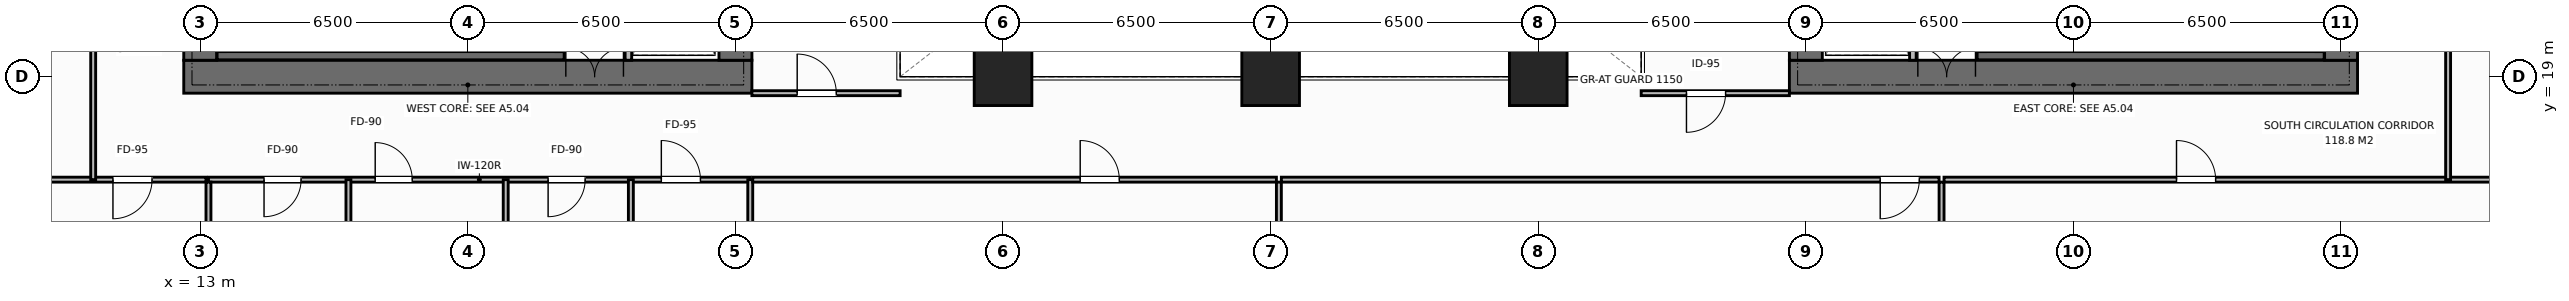
"""IFC4 building model, lengths in metres.
Left out: names, types, materials, properties, quantities, classifications, styles, units other than length and angle.
Written with IfcOpenShell. Run it as: python <this file> out.ifc"""

import sys

from ifc_helpers import new_model, si_unit, direction, frame, frame_2d, origin, origin_2d, place, context, subcontext, project, spatial, rectangle, extrude, element, fill, save


model = new_model("IFC4")
c1 = context("Model", 3, precision=1e-05, world=origin(), true_north=direction((0.0, 1.0)))
c2 = subcontext(c1, "Body", "Model", "MODEL_VIEW")
j1 = project(units=[si_unit("LENGTHUNIT", "METRE"), si_unit("PLANEANGLEUNIT", "RADIAN")], contexts=[c1])
p1 = place(None, origin())
s1 = spatial("IfcSite", under=j1, at=p1, CompositionType="ELEMENT")
p2 = place(p1, origin())
s2 = spatial("IfcBuilding", under=s1, at=p2, CompositionType="ELEMENT")
p3 = place(p2, frame((0.0, 0.0, 39.2)))
s3 = spatial("IfcBuildingStorey", under=s2, at=p3, CompositionType="ELEMENT", Elevation=39.2)
p4 = place(p3, frame((12.6, 19.0, 0.0), z_axis=(0.0, 0.0, 1.0), x_axis=(1.0, 0.0, 0.0)))
e1 = element("IfcWall", 1, at=p4, inside=s3, PredefinedType="SHEAR", context=c2, shape_type="SweptSolid", body=[
    extrude(rectangle(XDim=13.8, YDim=0.8, at=frame_2d((6.9, 0.0))), origin(), (0.0, 0.0, 1.0), 3.8),
])
p5 = place(p4, frame((9.28, 0.0, 0.0)))
e2 = element("IfcOpeningElement", 2, at=p5, cuts=e1, PredefinedType="OPENING", context=c2, shape_type="SweptSolid", body=[
    extrude(rectangle(XDim=1.4, YDim=2.2, at=frame_2d((0.7, 1.1))), frame((0.0, 0.41, 0.0), z_axis=(0.0, -1.0, 0.0), x_axis=(1.0, 0.0, 0.0)), (0.0, 0.0, 1.0), 0.82),
])
p6 = place(p3, frame((13.0, 19.4, 0.0), z_axis=(0.0, 0.0, 1.0), x_axis=(0.0, 1.0, 0.0)))
e3 = element("IfcWall", 3, at=p6, inside=s3, PredefinedType="SHEAR", context=c2, shape_type="SweptSolid", body=[
    extrude(rectangle(XDim=13.2, YDim=0.8, at=frame_2d((6.6, 0.0))), origin(), (0.0, 0.0, 1.0), 3.8),
])
p7 = place(p6, frame((4.65, 0.0, 0.0)))
e4 = element("IfcOpeningElement", 4, at=p7, cuts=e3, PredefinedType="OPENING", context=c2, shape_type="SweptSolid", body=[
    extrude(rectangle(XDim=1.4, YDim=2.2, at=frame_2d((0.7, 1.1))), frame((0.0, 0.41, 0.0), z_axis=(0.0, -1.0, 0.0), x_axis=(1.0, 0.0, 0.0)), (0.0, 0.0, 1.0), 0.82),
])
p8 = place(p3, frame((26.0, 19.4, 0.0), z_axis=(0.0, 0.0, 1.0), x_axis=(0.0, 1.0, 0.0)))
e5 = element("IfcWall", 5, at=p8, inside=s3, PredefinedType="SHEAR", context=c2, shape_type="SweptSolid", body=[
    extrude(rectangle(XDim=13.2, YDim=0.8, at=frame_2d((6.6, 0.0))), origin(), (0.0, 0.0, 1.0), 3.8),
])
p9 = place(p3, frame((51.6, 19.0, 0.0), z_axis=(0.0, 0.0, 1.0), x_axis=(1.0, 0.0, 0.0)))
e6 = element("IfcWall", 6, at=p9, inside=s3, PredefinedType="SHEAR", context=c2, shape_type="SweptSolid", body=[
    extrude(rectangle(XDim=13.8, YDim=0.8, at=frame_2d((6.9, 0.0))), origin(), (0.0, 0.0, 1.0), 3.8),
])
p10 = place(p9, frame((3.12, 0.0, 0.0)))
e7 = element("IfcOpeningElement", 7, at=p10, cuts=e6, PredefinedType="OPENING", context=c2, shape_type="SweptSolid", body=[
    extrude(rectangle(XDim=1.4, YDim=2.2, at=frame_2d((0.7, 1.1))), frame((0.0, 0.41, 0.0), z_axis=(0.0, -1.0, 0.0), x_axis=(1.0, 0.0, 0.0)), (0.0, 0.0, 1.0), 0.82),
])
p11 = place(p3, frame((52.0, 19.4, 0.0), z_axis=(0.0, 0.0, 1.0), x_axis=(0.0, 1.0, 0.0)))
e8 = element("IfcWall", 8, at=p11, inside=s3, PredefinedType="SHEAR", context=c2, shape_type="SweptSolid", body=[
    extrude(rectangle(XDim=13.2, YDim=0.8, at=frame_2d((6.6, 0.0))), origin(), (0.0, 0.0, 1.0), 3.8),
])
p12 = place(p3, frame((65.0, 19.4, 0.0), z_axis=(0.0, 0.0, 1.0), x_axis=(0.0, 1.0, 0.0)))
e9 = element("IfcWall", 9, at=p12, inside=s3, PredefinedType="SHEAR", context=c2, shape_type="SweptSolid", body=[
    extrude(rectangle(XDim=13.2, YDim=0.8, at=frame_2d((6.6, 0.0))), origin(), (0.0, 0.0, 1.0), 3.8),
])
p13 = place(p12, frame((8.05, 0.0, 0.0)))
e10 = element("IfcOpeningElement", 10, at=p13, cuts=e9, PredefinedType="OPENING", context=c2, shape_type="SweptSolid", body=[
    extrude(rectangle(XDim=1.3, YDim=2.2, at=frame_2d((0.65, 1.1))), frame((0.0, 0.41, 0.0), z_axis=(0.0, -1.0, 0.0), x_axis=(1.0, 0.0, 0.0)), (0.0, 0.0, 1.0), 0.82),
])
for number, where, z_axis, x_axis in (
    (11, (13.41, 19.51, 0.0), (0.0, 0.0, 1.0), (1.0, 0.0, 0.0)),
    (12, (56.16, 19.51, 0.0), (0.0, 0.0, 1.0), (1.0, 0.0, 0.0)),
):
    element("IfcWall", number, at=place(p3, frame(where, z_axis=z_axis, x_axis=x_axis)), inside=s3, PredefinedType="SHEAR", context=c2, shape_type="SweptSolid", body=[
        extrude(rectangle(XDim=8.43, YDim=0.2, at=frame_2d((4.215, 0.0))), origin(), (0.0, 0.0, 1.0), 3.8),
    ])
for number, where, z_axis, x_axis in (
    (13, (32.5, 19.0, 0.0), (0.0, 0.0, 1.0), (1.0, 0.0, 0.0)),
    (14, (39.0, 19.0, 0.0), (0.0, 0.0, 1.0), (1.0, 0.0, 0.0)),
    (15, (45.5, 19.0, 0.0), (0.0, 0.0, 1.0), (1.0, 0.0, 0.0)),
):
    element("IfcColumn", number, at=place(p3, frame(where, z_axis=z_axis, x_axis=x_axis)), inside=s3, PredefinedType="COLUMN", context=c2, shape_type="SweptSolid", body=[
        extrude(rectangle(XDim=1.4, YDim=1.4, at=origin_2d()), origin(), (0.0, 0.0, 1.0), 3.8),
    ])
p14 = place(p3, frame((23.4, 19.4, 0.0), z_axis=(0.0, 0.0, 1.0), x_axis=(0.0, 1.0, 0.0)))
e16 = element("IfcWall", 16, at=p14, inside=s3, PredefinedType="STANDARD", context=c2, shape_type="SweptSolid", body=[
    extrude(rectangle(XDim=13.2, YDim=0.16, at=frame_2d((6.6, 0.0))), origin(), (0.0, 0.0, 1.0), 3.55),
])
p15 = place(p14, frame((0.55, 0.0, 0.0)))
e17 = element("IfcOpeningElement", 17, at=p15, cuts=e16, PredefinedType="OPENING", context=c2, shape_type="SweptSolid", body=[
    extrude(rectangle(XDim=1.1, YDim=2.2, at=frame_2d((0.55, 1.1))), frame((0.0, 0.09, 0.0), z_axis=(0.0, -1.0, 0.0), x_axis=(1.0, 0.0, 0.0)), (0.0, 0.0, 1.0), 0.18),
])
p16 = place(p14, frame((2.7, 0.0, 0.0)))
e18 = element("IfcOpeningElement", 18, at=p16, cuts=e16, PredefinedType="OPENING", context=c2, shape_type="SweptSolid", body=[
    extrude(rectangle(XDim=1.1, YDim=2.2, at=frame_2d((0.55, 1.1))), frame((0.0, 0.09, 0.0), z_axis=(0.0, -1.0, 0.0), x_axis=(1.0, 0.0, 0.0)), (0.0, 0.0, 1.0), 0.18),
])
p17 = place(p3, frame((54.6, 19.4, 0.0), z_axis=(0.0, 0.0, 1.0), x_axis=(0.0, 1.0, 0.0)))
e19 = element("IfcWall", 19, at=p17, inside=s3, PredefinedType="STANDARD", context=c2, shape_type="SweptSolid", body=[
    extrude(rectangle(XDim=13.2, YDim=0.16, at=frame_2d((6.6, 0.0))), origin(), (0.0, 0.0, 1.0), 3.55),
])
p18 = place(p17, frame((0.55, 0.0, 0.0)))
e20 = element("IfcOpeningElement", 20, at=p18, cuts=e19, PredefinedType="OPENING", context=c2, shape_type="SweptSolid", body=[
    extrude(rectangle(XDim=1.1, YDim=2.2, at=frame_2d((0.55, 1.1))), frame((0.0, 0.09, 0.0), z_axis=(0.0, -1.0, 0.0), x_axis=(1.0, 0.0, 0.0)), (0.0, 0.0, 1.0), 0.18),
])
p19 = place(p17, frame((2.7, 0.0, 0.0)))
e21 = element("IfcOpeningElement", 21, at=p19, cuts=e19, PredefinedType="OPENING", context=c2, shape_type="SweptSolid", body=[
    extrude(rectangle(XDim=1.1, YDim=2.2, at=frame_2d((0.55, 1.1))), frame((0.0, 0.09, 0.0), z_axis=(0.0, -1.0, 0.0), x_axis=(1.0, 0.0, 0.0)), (0.0, 0.0, 1.0), 0.18),
])
p20 = place(p3, frame((26.4, 18.6, 0.0), z_axis=(0.0, 0.0, 1.0), x_axis=(1.0, 0.0, 0.0)))
e22 = element("IfcWall", 22, at=p20, inside=s3, PredefinedType="PARTITIONING", context=c2, shape_type="SweptSolid", body=[
    extrude(rectangle(XDim=3.6, YDim=0.12, at=frame_2d((1.8, 0.0))), origin(), (0.0, 0.0, 1.0), 3.55),
])
p21 = place(p20, frame((1.1, 0.0, 0.0)))
e23 = element("IfcOpeningElement", 23, at=p21, cuts=e22, PredefinedType="OPENING", context=c2, shape_type="SweptSolid", body=[
    extrude(rectangle(XDim=0.95, YDim=2.15, at=frame_2d((0.475, 1.075))), frame((0.0, 0.07, 0.0), z_axis=(0.0, -1.0, 0.0), x_axis=(1.0, 0.0, 0.0)), (0.0, 0.0, 1.0), 0.14),
])
p22 = place(p3, frame((48.0, 18.6, 0.0), z_axis=(0.0, 0.0, 1.0), x_axis=(1.0, 0.0, 0.0)))
e24 = element("IfcWall", 24, at=p22, inside=s3, PredefinedType="PARTITIONING", context=c2, shape_type="SweptSolid", body=[
    extrude(rectangle(XDim=3.6, YDim=0.12, at=frame_2d((1.8, 0.0))), origin(), (0.0, 0.0, 1.0), 3.55),
])
p23 = place(p22, frame((1.1, 0.0, 0.0)))
e25 = element("IfcOpeningElement", 25, at=p23, cuts=e24, PredefinedType="OPENING", context=c2, shape_type="SweptSolid", body=[
    extrude(rectangle(XDim=0.95, YDim=2.15, at=frame_2d((0.475, 1.075))), frame((0.0, 0.07, 0.0), z_axis=(0.0, -1.0, 0.0), x_axis=(1.0, 0.0, 0.0)), (0.0, 0.0, 1.0), 0.14),
])
p24 = place(p3, frame((13.2, 16.5, 0.0), z_axis=(0.0, 0.0, 1.0), x_axis=(1.0, 0.0, 0.0)))
e26 = element("IfcWall", 26, at=p24, inside=s3, PredefinedType="PARTITIONING", context=c2, shape_type="SweptSolid", body=[
    extrude(rectangle(XDim=13.16, YDim=0.12, at=frame_2d((6.58, 0.0))), origin(), (0.0, 0.0, 1.0), 3.55),
])
p25 = place(p24, frame((1.35, 0.0, 0.0)))
e27 = element("IfcOpeningElement", 27, at=p25, cuts=e26, PredefinedType="OPENING", context=c2, shape_type="SweptSolid", body=[
    extrude(rectangle(XDim=0.9, YDim=2.15, at=frame_2d((0.45, 1.075))), frame((0.0, 0.07, 0.0), z_axis=(0.0, -1.0, 0.0), x_axis=(1.0, 0.0, 0.0)), (0.0, 0.0, 1.0), 0.14),
])
p26 = place(p24, frame((4.05, 0.0, 0.0)))
e28 = element("IfcOpeningElement", 28, at=p26, cuts=e26, PredefinedType="OPENING", context=c2, shape_type="SweptSolid", body=[
    extrude(rectangle(XDim=0.9, YDim=2.15, at=frame_2d((0.45, 1.075))), frame((0.0, 0.07, 0.0), z_axis=(0.0, -1.0, 0.0), x_axis=(1.0, 0.0, 0.0)), (0.0, 0.0, 1.0), 0.14),
])
p27 = place(p24, frame((8.25, 0.0, 0.0)))
e29 = element("IfcOpeningElement", 29, at=p27, cuts=e26, PredefinedType="OPENING", context=c2, shape_type="SweptSolid", body=[
    extrude(rectangle(XDim=0.9, YDim=2.15, at=frame_2d((0.45, 1.075))), frame((0.0, 0.07, 0.0), z_axis=(0.0, -1.0, 0.0), x_axis=(1.0, 0.0, 0.0)), (0.0, 0.0, 1.0), 0.14),
])
p28 = place(p24, frame((11.0, 0.0, 0.0)))
e30 = element("IfcOpeningElement", 30, at=p28, cuts=e26, PredefinedType="OPENING", context=c2, shape_type="SweptSolid", body=[
    extrude(rectangle(XDim=0.95, YDim=2.15, at=frame_2d((0.475, 1.075))), frame((0.0, 0.07, 0.0), z_axis=(0.0, -1.0, 0.0), x_axis=(1.0, 0.0, 0.0)), (0.0, 0.0, 1.0), 0.14),
])
for number, where, z_axis, x_axis in (
    (31, (16.6, 13.82, 0.0), (0.0, 0.0, 1.0), (0.0, 1.0, 0.0)),
    (32, (20.42, 13.82, 0.0), (0.0, 0.0, 1.0), (0.0, 1.0, 0.0)),
    (33, (23.46, 13.82, 0.0), (0.0, 0.0, 1.0), (0.0, 1.0, 0.0)),
    (34, (26.36, 13.82, 0.0), (0.0, 0.0, 1.0), (0.0, 1.0, 0.0)),
):
    element("IfcWall", number, at=place(p3, frame(where, z_axis=z_axis, x_axis=x_axis)), inside=s3, PredefinedType="PARTITIONING", context=c2, shape_type="SweptSolid", body=[
        extrude(rectangle(XDim=2.68, YDim=0.12, at=frame_2d((1.34, 0.0))), origin(), (0.0, 0.0, 1.0), 3.55),
    ])
p29 = place(p3, frame((13.2, 0.02, 0.0), z_axis=(0.0, 0.0, 1.0), x_axis=(0.0, 1.0, 0.0)))
e35 = element("IfcWall", 35, at=p29, inside=s3, PredefinedType="PARTITIONING", context=c2, shape_type="SweptSolid", body=[
    extrude(rectangle(XDim=16.42, YDim=0.12, at=frame_2d((8.21, 0.0))), origin(), (0.0, 0.0, 1.0), 2.9),
])
p30 = place(p3, frame((-0.02, 16.5, 0.0), z_axis=(0.0, 0.0, 1.0), x_axis=(1.0, 0.0, 0.0)))
e36 = element("IfcWall", 36, at=p30, inside=s3, PredefinedType="PARTITIONING", context=c2, shape_type="SweptSolid", body=[
    extrude(rectangle(XDim=13.16, YDim=0.12, at=frame_2d((6.58, 0.0))), origin(), (0.0, 0.0, 1.0), 3.55),
])
p31 = place(p30, frame((10.9, 0.0, 0.0)))
e37 = element("IfcOpeningElement", 37, at=p31, cuts=e36, PredefinedType="OPENING", context=c2, shape_type="SweptSolid", body=[
    extrude(rectangle(XDim=0.95, YDim=2.15, at=frame_2d((0.475, 1.075))), frame((0.0, 0.07, 0.0), z_axis=(0.0, -1.0, 0.0), x_axis=(1.0, 0.0, 0.0)), (0.0, 0.0, 1.0), 0.14),
])
p32 = place(p3, frame((39.2, 0.02, 0.0), z_axis=(0.0, 0.0, 1.0), x_axis=(0.0, 1.0, 0.0)))
e38 = element("IfcWall", 38, at=p32, inside=s3, PredefinedType="PARTITIONING", context=c2, shape_type="SweptSolid", body=[
    extrude(rectangle(XDim=16.42, YDim=0.12, at=frame_2d((8.21, 0.0))), origin(), (0.0, 0.0, 1.0), 2.9),
])
p33 = place(p3, frame((26.42, 16.5, 0.0), z_axis=(0.0, 0.0, 1.0), x_axis=(1.0, 0.0, 0.0)))
e39 = element("IfcWall", 39, at=p33, inside=s3, PredefinedType="PARTITIONING", context=c2, shape_type="SweptSolid", body=[
    extrude(rectangle(XDim=12.72, YDim=0.12, at=frame_2d((6.36, 0.0))), origin(), (0.0, 0.0, 1.0), 3.55),
])
p34 = place(p33, frame((7.954, 0.0, 0.0)))
e40 = element("IfcOpeningElement", 40, at=p34, cuts=e39, PredefinedType="OPENING", context=c2, shape_type="SweptSolid", body=[
    extrude(rectangle(XDim=0.95, YDim=2.15, at=frame_2d((0.475, 1.075))), frame((0.0, 0.07, 0.0), z_axis=(0.0, -1.0, 0.0), x_axis=(1.0, 0.0, 0.0)), (0.0, 0.0, 1.0), 0.14),
])
p35 = place(p3, frame((55.296, 0.02, 0.0), z_axis=(0.0, 0.0, 1.0), x_axis=(0.0, 1.0, 0.0)))
e41 = element("IfcWall", 41, at=p35, inside=s3, PredefinedType="PARTITIONING", context=c2, shape_type="SweptSolid", body=[
    extrude(rectangle(XDim=16.42, YDim=0.12, at=frame_2d((8.21, 0.0))), origin(), (0.0, 0.0, 1.0), 3.55),
])
p36 = place(p3, frame((39.26, 16.5, 0.0), z_axis=(0.0, 0.0, 1.0), x_axis=(1.0, 0.0, 0.0)))
e42 = element("IfcWall", 42, at=p36, inside=s3, PredefinedType="PARTITIONING", context=c2, shape_type="SweptSolid", body=[
    extrude(rectangle(XDim=15.976, YDim=0.12, at=frame_2d((7.988, 0.0))), origin(), (0.0, 0.0, 1.0), 3.55),
])
p37 = place(p36, frame((14.546, 0.0, 0.0)))
e43 = element("IfcOpeningElement", 43, at=p37, cuts=e42, PredefinedType="OPENING", context=c2, shape_type="SweptSolid", body=[
    extrude(rectangle(XDim=0.95, YDim=2.15, at=frame_2d((0.475, 1.075))), frame((0.0, 0.07, 0.0), z_axis=(0.0, -1.0, 0.0), x_axis=(1.0, 0.0, 0.0)), (0.0, 0.0, 1.0), 0.14),
])
p38 = place(p3, frame((55.356, 16.5, 0.0), z_axis=(0.0, 0.0, 1.0), x_axis=(1.0, 0.0, 0.0)))
e44 = element("IfcWall", 44, at=p38, inside=s3, PredefinedType="PARTITIONING", context=c2, shape_type="SweptSolid", body=[
    extrude(rectangle(XDim=22.664, YDim=0.12, at=frame_2d((11.332, 0.0))), origin(), (0.0, 0.0, 1.0), 3.55),
])
p39 = place(p38, frame((5.647, 0.0, 0.0)))
e45 = element("IfcOpeningElement", 45, at=p39, cuts=e44, PredefinedType="OPENING", context=c2, shape_type="SweptSolid", body=[
    extrude(rectangle(XDim=0.95, YDim=2.15, at=frame_2d((0.475, 1.075))), frame((0.0, 0.07, 0.0), z_axis=(0.0, -1.0, 0.0), x_axis=(1.0, 0.0, 0.0)), (0.0, 0.0, 1.0), 0.14),
])
p40 = place(p3, frame((10.4, 16.5, 0.0), z_axis=(0.0, 0.0, 1.0), x_axis=(0.0, 1.0, 0.0)))
e46 = element("IfcWall", 46, at=p40, inside=s3, PredefinedType="PARTITIONING", context=c2, shape_type="SweptSolid", body=[
    extrude(rectangle(XDim=9.5, YDim=0.12, at=frame_2d((4.75, 0.0))), origin(), (0.0, 0.0, 1.0), 3.55),
])
p41 = place(p40, frame((5.325, 0.0, 0.0)))
e47 = element("IfcOpeningElement", 47, at=p41, cuts=e46, PredefinedType="OPENING", context=c2, shape_type="SweptSolid", body=[
    extrude(rectangle(XDim=0.95, YDim=2.15, at=frame_2d((0.475, 1.075))), frame((0.0, 0.07, 0.0), z_axis=(0.0, -1.0, 0.0), x_axis=(1.0, 0.0, 0.0)), (0.0, 0.0, 1.0), 0.14),
])
p42 = place(p3, frame((67.6, 16.5, 0.0), z_axis=(0.0, 0.0, 1.0), x_axis=(0.0, 1.0, 0.0)))
e48 = element("IfcWall", 48, at=p42, inside=s3, PredefinedType="PARTITIONING", context=c2, shape_type="SweptSolid", body=[
    extrude(rectangle(XDim=19.0, YDim=0.12, at=frame_2d((9.5, 0.0))), origin(), (0.0, 0.0, 1.0), 3.55),
])
p43 = place(p42, frame((9.025, 0.0, 0.0)))
e49 = element("IfcOpeningElement", 49, at=p43, cuts=e48, PredefinedType="OPENING", context=c2, shape_type="SweptSolid", body=[
    extrude(rectangle(XDim=0.95, YDim=2.15, at=frame_2d((0.475, 1.075))), frame((0.0, 0.07, 0.0), z_axis=(0.0, -1.0, 0.0), x_axis=(1.0, 0.0, 0.0)), (0.0, 0.0, 1.0), 0.14),
])
p44 = place(p5, origin())
e50 = element("IfcDoor", 50, at=p44, inside=s3, OperationType="DOUBLE_DOOR_SINGLE_SWING", PredefinedType="DOOR", context=c2, shape_type="SweptSolid", body=[
    extrude(rectangle(XDim=1.4, YDim=2.2, at=frame_2d((0.7, 1.1))), frame((0.0, 0.125, 0.0), z_axis=(0.0, -1.0, 0.0), x_axis=(1.0, 0.0, 0.0)), (0.0, 0.0, 1.0), 0.05),
])
fill(e2, e50)
p45 = place(p10, origin())
e51 = element("IfcDoor", 51, at=p45, inside=s3, OperationType="DOUBLE_DOOR_SINGLE_SWING", PredefinedType="DOOR", context=c2, shape_type="SweptSolid", body=[
    extrude(rectangle(XDim=1.4, YDim=2.2, at=frame_2d((0.7, 1.1))), frame((0.0, 0.125, 0.0), z_axis=(0.0, -1.0, 0.0), x_axis=(1.0, 0.0, 0.0)), (0.0, 0.0, 1.0), 0.05),
])
fill(e7, e51)
p46 = place(p21, origin())
e52 = element("IfcDoor", 52, at=p46, inside=s3, OperationType="SINGLE_SWING_LEFT", PredefinedType="DOOR", context=c2, shape_type="SweptSolid", body=[
    extrude(rectangle(XDim=0.95, YDim=2.15, at=frame_2d((0.475, 1.075))), frame((0.0, 0.025, 0.0), z_axis=(0.0, -1.0, 0.0), x_axis=(1.0, 0.0, 0.0)), (0.0, 0.0, 1.0), 0.05),
])
fill(e23, e52)
p47 = place(p23, origin())
e53 = element("IfcDoor", 53, at=p47, inside=s3, OperationType="SINGLE_SWING_RIGHT", PredefinedType="DOOR", context=c2, shape_type="SweptSolid", body=[
    extrude(rectangle(XDim=0.95, YDim=2.15, at=frame_2d((0.475, 1.075))), frame((0.0, 0.025, 0.0), z_axis=(0.0, -1.0, 0.0), x_axis=(1.0, 0.0, 0.0)), (0.0, 0.0, 1.0), 0.05),
])
fill(e25, e53)
p48 = place(p25, origin())
e54 = element("IfcDoor", 54, at=p48, inside=s3, OperationType="SINGLE_SWING_RIGHT", PredefinedType="DOOR", context=c2, shape_type="SweptSolid", body=[
    extrude(rectangle(XDim=0.9, YDim=2.15, at=frame_2d((0.45, 1.075))), frame((0.0, 0.025, 0.0), z_axis=(0.0, -1.0, 0.0), x_axis=(1.0, 0.0, 0.0)), (0.0, 0.0, 1.0), 0.05),
])
fill(e27, e54)
p49 = place(p26, origin())
e55 = element("IfcDoor", 55, at=p49, inside=s3, OperationType="SINGLE_SWING_LEFT", PredefinedType="DOOR", context=c2, shape_type="SweptSolid", body=[
    extrude(rectangle(XDim=0.9, YDim=2.15, at=frame_2d((0.45, 1.075))), frame((0.0, 0.025, 0.0), z_axis=(0.0, -1.0, 0.0), x_axis=(1.0, 0.0, 0.0)), (0.0, 0.0, 1.0), 0.05),
])
fill(e28, e55)
p50 = place(p27, origin())
e56 = element("IfcDoor", 56, at=p50, inside=s3, OperationType="SINGLE_SWING_RIGHT", PredefinedType="DOOR", context=c2, shape_type="SweptSolid", body=[
    extrude(rectangle(XDim=0.9, YDim=2.15, at=frame_2d((0.45, 1.075))), frame((0.0, 0.025, 0.0), z_axis=(0.0, -1.0, 0.0), x_axis=(1.0, 0.0, 0.0)), (0.0, 0.0, 1.0), 0.05),
])
fill(e29, e56)
p51 = place(p28, origin())
e57 = element("IfcDoor", 57, at=p51, inside=s3, OperationType="SINGLE_SWING_LEFT", PredefinedType="DOOR", context=c2, shape_type="SweptSolid", body=[
    extrude(rectangle(XDim=0.95, YDim=2.15, at=frame_2d((0.475, 1.075))), frame((0.0, 0.025, 0.0), z_axis=(0.0, -1.0, 0.0), x_axis=(1.0, 0.0, 0.0)), (0.0, 0.0, 1.0), 0.05),
])
fill(e30, e57)
p52 = place(p31, origin())
e58 = element("IfcDoor", 58, at=p52, inside=s3, OperationType="SINGLE_SWING_RIGHT", PredefinedType="DOOR", context=c2, shape_type="SweptSolid", body=[
    extrude(rectangle(XDim=0.95, YDim=2.15, at=frame_2d((0.475, 1.075))), frame((0.0, 0.025, 0.0), z_axis=(0.0, -1.0, 0.0), x_axis=(1.0, 0.0, 0.0)), (0.0, 0.0, 1.0), 0.05),
])
fill(e37, e58)
p53 = place(p34, origin())
e59 = element("IfcDoor", 59, at=p53, inside=s3, OperationType="SINGLE_SWING_LEFT", PredefinedType="DOOR", context=c2, shape_type="SweptSolid", body=[
    extrude(rectangle(XDim=0.95, YDim=2.15, at=frame_2d((0.475, 1.075))), frame((0.0, 0.025, 0.0), z_axis=(0.0, -1.0, 0.0), x_axis=(1.0, 0.0, 0.0)), (0.0, 0.0, 1.0), 0.05),
])
fill(e40, e59)
p54 = place(p37, origin())
e60 = element("IfcDoor", 60, at=p54, inside=s3, OperationType="SINGLE_SWING_RIGHT", PredefinedType="DOOR", context=c2, shape_type="SweptSolid", body=[
    extrude(rectangle(XDim=0.95, YDim=2.15, at=frame_2d((0.475, 1.075))), frame((0.0, 0.025, 0.0), z_axis=(0.0, -1.0, 0.0), x_axis=(1.0, 0.0, 0.0)), (0.0, 0.0, 1.0), 0.05),
])
fill(e43, e60)
p55 = place(p39, origin())
e61 = element("IfcDoor", 61, at=p55, inside=s3, OperationType="SINGLE_SWING_LEFT", PredefinedType="DOOR", context=c2, shape_type="SweptSolid", body=[
    extrude(rectangle(XDim=0.95, YDim=2.15, at=frame_2d((0.475, 1.075))), frame((0.0, 0.025, 0.0), z_axis=(0.0, -1.0, 0.0), x_axis=(1.0, 0.0, 0.0)), (0.0, 0.0, 1.0), 0.05),
])
fill(e45, e61)
save(model, sys.argv[1])
